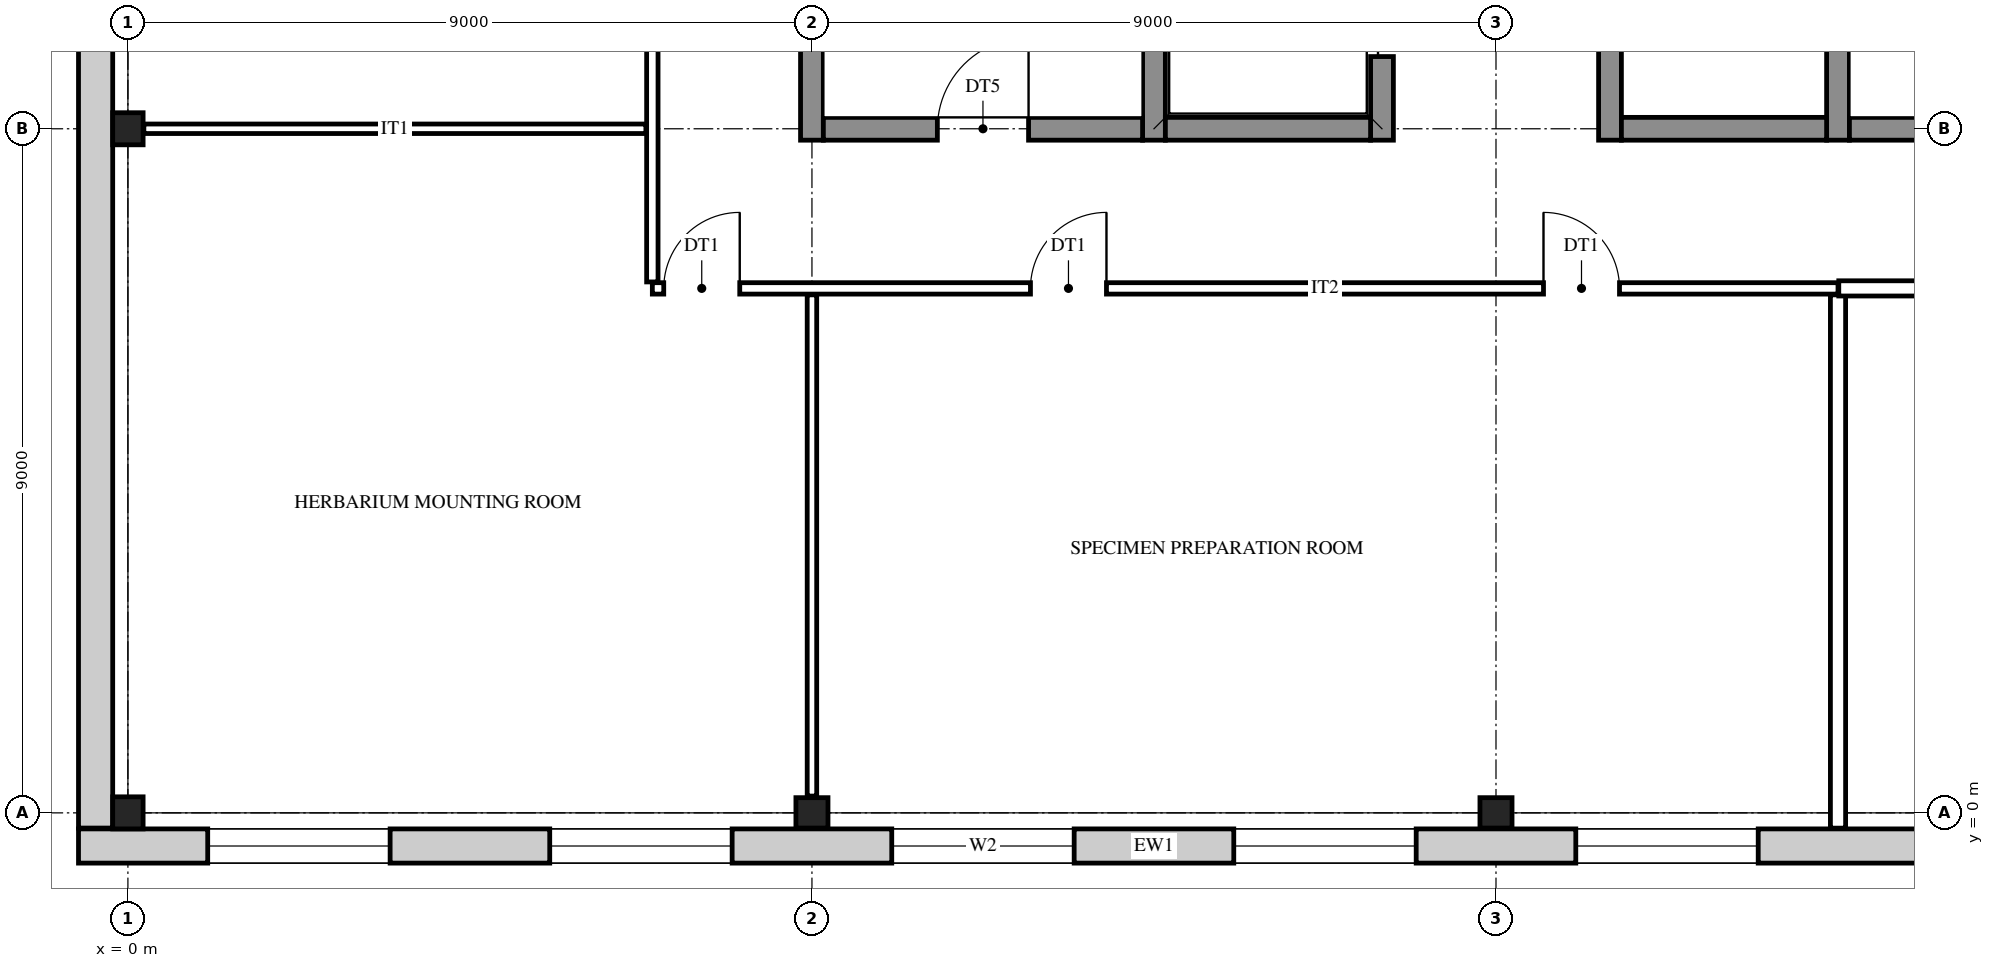
"""IFC4 building model, lengths in metres.
Left out: names, types, materials, properties, quantities, classifications, styles, units other than length and angle.
Written with IfcOpenShell. Run it as: python <this file> out.ifc"""

import sys

from ifc_helpers import new_model, si_unit, direction, frame, frame_2d, origin, origin_2d, place, context, subcontext, project, spatial, rectangle, i_section, extrude, element, fill, save


model = new_model("IFC4")
c1 = context("Model", 3, precision=1e-05, world=origin(), true_north=direction((0.0, 1.0)))
c2 = subcontext(c1, "Body", "Model", "MODEL_VIEW")
j1 = project(units=[si_unit("LENGTHUNIT", "METRE"), si_unit("PLANEANGLEUNIT", "RADIAN")], contexts=[c1])
p1 = place(None, origin())
s1 = spatial("IfcSite", under=j1, at=p1, CompositionType="ELEMENT")
p2 = place(p1, origin())
s2 = spatial("IfcBuilding", under=s1, at=p2, CompositionType="ELEMENT")
p3 = place(p2, frame((0.0, 0.0, 10.5)))
s3 = spatial("IfcBuildingStorey", under=s2, at=p3, CompositionType="ELEMENT", Elevation=10.5)
for number, where, z_axis, x_axis in (
    (1, (0.0, 0.0, 0.0), (0.0, 0.0, 1.0), (1.0, 0.0, 0.0)),
    (2, (0.0, 9.0, 0.0), (0.0, 0.0, 1.0), (1.0, 0.0, 0.0)),
    (3, (9.0, 0.0, 0.0), (0.0, 0.0, 1.0), (0.0, 1.0, 0.0)),
    (4, (18.0, 0.0, 0.0), (0.0, 0.0, 1.0), (0.0, 1.0, 0.0)),
):
    element("IfcColumn", number, at=place(p3, frame(where, z_axis=z_axis, x_axis=x_axis)), inside=s3, PredefinedType="COLUMN", context=c2, shape_type="SweptSolid", body=[
        extrude(i_section(OverallWidth=0.4, OverallDepth=0.422, WebThickness=0.028, FlangeThickness=0.036, at=origin_2d()), origin(), (0.0, 0.0, 1.0), 4.5),
    ])
for number, where, z_axis, x_axis in (
    (5, (9.0, 8.85, 0.0), (0.0, 0.0, 1.0), (0.0, 1.0, 0.0)),
    (6, (13.5, 8.85, 0.0), (0.0, 0.0, 1.0), (0.0, 1.0, 0.0)),
):
    element("IfcWall", number, at=place(p3, frame(where, z_axis=z_axis, x_axis=x_axis)), inside=s3, PredefinedType="SHEAR", context=c2, shape_type="SweptSolid", body=[
        extrude(rectangle(XDim=9.3, YDim=0.3, at=frame_2d((4.65, 0.0))), origin(), (0.0, 0.0, 1.0), 4.5),
    ])
p4 = place(p3, frame((16.5, 8.85, 0.0), z_axis=(0.0, 0.0, 1.0), x_axis=(0.0, 1.0, 0.0)))
e7 = element("IfcWall", 7, at=p4, inside=s3, PredefinedType="SHEAR", context=c2, shape_type="SweptSolid", body=[
    extrude(rectangle(XDim=9.3, YDim=0.3, at=frame_2d((4.65, 0.0))), origin(), (0.0, 0.0, 1.0), 4.5),
])
p5 = place(p4, frame((1.1, 0.0, 0.0)))
e8 = element("IfcOpeningElement", 8, at=p5, cuts=e7, PredefinedType="OPENING", context=c2, shape_type="SweptSolid", body=[
    extrude(rectangle(XDim=1.1, YDim=2.1, at=frame_2d((0.55, 1.05))), frame((0.0, 0.16, 0.0), z_axis=(0.0, -1.0, 0.0), x_axis=(1.0, 0.0, 0.0)), (0.0, 0.0, 1.0), 0.32),
])
p6 = place(p4, frame((4.1, 0.0, 0.0)))
e9 = element("IfcOpeningElement", 9, at=p6, cuts=e7, PredefinedType="OPENING", context=c2, shape_type="SweptSolid", body=[
    extrude(rectangle(XDim=1.1, YDim=2.1, at=frame_2d((0.55, 1.05))), frame((0.0, 0.16, 0.0), z_axis=(0.0, -1.0, 0.0), x_axis=(1.0, 0.0, 0.0)), (0.0, 0.0, 1.0), 0.32),
])
p7 = place(p3, frame((19.5, 8.85, 0.0), z_axis=(0.0, 0.0, 1.0), x_axis=(0.0, 1.0, 0.0)))
e10 = element("IfcWall", 10, at=p7, inside=s3, PredefinedType="SHEAR", context=c2, shape_type="SweptSolid", body=[
    extrude(rectangle(XDim=9.3, YDim=0.3, at=frame_2d((4.65, 0.0))), origin(), (0.0, 0.0, 1.0), 4.5),
])
p8 = place(p7, frame((3.95, 0.0, 0.0)))
e11 = element("IfcOpeningElement", 11, at=p8, cuts=e10, PredefinedType="OPENING", context=c2, shape_type="SweptSolid", body=[
    extrude(rectangle(XDim=1.4, YDim=2.1, at=frame_2d((0.7, 1.05))), frame((0.0, 0.16, 0.0), z_axis=(0.0, -1.0, 0.0), x_axis=(1.0, 0.0, 0.0)), (0.0, 0.0, 1.0), 0.32),
])
p9 = place(p7, frame((7.1, 0.0, 0.0)))
e12 = element("IfcOpeningElement", 12, at=p9, cuts=e10, PredefinedType="OPENING", context=c2, shape_type="SweptSolid", body=[
    extrude(rectangle(XDim=1.1, YDim=2.1, at=frame_2d((0.55, 1.05))), frame((0.0, 0.16, 0.0), z_axis=(0.0, -1.0, 0.0), x_axis=(1.0, 0.0, 0.0)), (0.0, 0.0, 1.0), 0.32),
])
p10 = place(p3, frame((22.5, 8.85, 0.0), z_axis=(0.0, 0.0, 1.0), x_axis=(0.0, 1.0, 0.0)))
e13 = element("IfcWall", 13, at=p10, inside=s3, PredefinedType="SHEAR", context=c2, shape_type="SweptSolid", body=[
    extrude(rectangle(XDim=9.3, YDim=0.3, at=frame_2d((4.65, 0.0))), origin(), (0.0, 0.0, 1.0), 4.5),
])
p11 = place(p3, frame((9.15, 9.0, 0.0), z_axis=(0.0, 0.0, 1.0), x_axis=(1.0, 0.0, 0.0)))
e14 = element("IfcWall", 14, at=p11, inside=s3, PredefinedType="SHEAR", context=c2, shape_type="SweptSolid", body=[
    extrude(rectangle(XDim=4.2, YDim=0.3, at=frame_2d((2.1, 0.0))), origin(), (0.0, 0.0, 1.0), 4.5),
])
p12 = place(p11, frame((1.5, 0.0, 0.0)))
e15 = element("IfcOpeningElement", 15, at=p12, cuts=e14, PredefinedType="OPENING", context=c2, shape_type="SweptSolid", body=[
    extrude(rectangle(XDim=1.2, YDim=2.1, at=frame_2d((0.6, 1.05))), frame((0.0, 0.16, 0.0), z_axis=(0.0, -1.0, 0.0), x_axis=(1.0, 0.0, 0.0)), (0.0, 0.0, 1.0), 0.32),
])
for number, where, z_axis, x_axis in (
    (16, (13.65, 9.0, 0.0), (0.0, 0.0, 1.0), (1.0, 0.0, 0.0)),
    (17, (19.65, 9.0, 0.0), (0.0, 0.0, 1.0), (1.0, 0.0, 0.0)),
):
    element("IfcWall", number, at=place(p3, frame(where, z_axis=z_axis, x_axis=x_axis)), inside=s3, PredefinedType="SHEAR", context=c2, shape_type="SweptSolid", body=[
        extrude(rectangle(XDim=2.7, YDim=0.3, at=frame_2d((1.35, 0.0))), origin(), (0.0, 0.0, 1.0), 4.5),
    ])
p13 = place(p3, frame((22.65, 9.0, 0.0), z_axis=(0.0, 0.0, 1.0), x_axis=(1.0, 0.0, 0.0)))
e18 = element("IfcWall", 18, at=p13, inside=s3, PredefinedType="SHEAR", context=c2, shape_type="SweptSolid", body=[
    extrude(rectangle(XDim=4.2, YDim=0.3, at=frame_2d((2.1, 0.0))), origin(), (0.0, 0.0, 1.0), 4.5),
])
p14 = place(p13, frame((1.5, 0.0, 0.0)))
e19 = element("IfcOpeningElement", 19, at=p14, cuts=e18, PredefinedType="OPENING", context=c2, shape_type="SweptSolid", body=[
    extrude(rectangle(XDim=1.2, YDim=2.1, at=frame_2d((0.6, 1.05))), frame((0.0, 0.16, 0.0), z_axis=(0.0, -1.0, 0.0), x_axis=(1.0, 0.0, 0.0)), (0.0, 0.0, 1.0), 0.32),
])
p15 = place(p3, frame((32.15, -0.436, 0.0), z_axis=(0.0, 0.0, 1.0), x_axis=(-1.0, 0.0, 0.0)))
e20 = element("IfcWall", 20, at=p15, inside=s3, PredefinedType="STANDARD", context=c2, shape_type="SweptSolid", body=[
    extrude(rectangle(XDim=32.8, YDim=0.45, at=frame_2d((16.4, 0.0))), origin(), (0.0, 0.0, 1.0), 4.5),
])
p16 = place(p15, frame((28.7, 0.0, 0.9)))
e21 = element("IfcOpeningElement", 21, at=p16, cuts=e20, PredefinedType="OPENING", context=c2, shape_type="SweptSolid", body=[
    extrude(rectangle(XDim=2.4, YDim=2.8, at=frame_2d((1.2, 1.4))), frame((0.0, 0.235, 0.0), z_axis=(0.0, -1.0, 0.0), x_axis=(1.0, 0.0, 0.0)), (0.0, 0.0, 1.0), 0.47),
])
p17 = place(p15, frame((24.2, 0.0, 0.9)))
e22 = element("IfcOpeningElement", 22, at=p17, cuts=e20, PredefinedType="OPENING", context=c2, shape_type="SweptSolid", body=[
    extrude(rectangle(XDim=2.4, YDim=2.8, at=frame_2d((1.2, 1.4))), frame((0.0, 0.235, 0.0), z_axis=(0.0, -1.0, 0.0), x_axis=(1.0, 0.0, 0.0)), (0.0, 0.0, 1.0), 0.47),
])
p18 = place(p15, frame((19.7, 0.0, 0.9)))
e23 = element("IfcOpeningElement", 23, at=p18, cuts=e20, PredefinedType="OPENING", context=c2, shape_type="SweptSolid", body=[
    extrude(rectangle(XDim=2.4, YDim=2.8, at=frame_2d((1.2, 1.4))), frame((0.0, 0.235, 0.0), z_axis=(0.0, -1.0, 0.0), x_axis=(1.0, 0.0, 0.0)), (0.0, 0.0, 1.0), 0.47),
])
p19 = place(p15, frame((15.2, 0.0, 0.9)))
e24 = element("IfcOpeningElement", 24, at=p19, cuts=e20, PredefinedType="OPENING", context=c2, shape_type="SweptSolid", body=[
    extrude(rectangle(XDim=2.4, YDim=2.8, at=frame_2d((1.2, 1.4))), frame((0.0, 0.235, 0.0), z_axis=(0.0, -1.0, 0.0), x_axis=(1.0, 0.0, 0.0)), (0.0, 0.0, 1.0), 0.47),
])
p20 = place(p15, frame((10.7, 0.0, 0.9)))
e25 = element("IfcOpeningElement", 25, at=p20, cuts=e20, PredefinedType="OPENING", context=c2, shape_type="SweptSolid", body=[
    extrude(rectangle(XDim=2.4, YDim=2.8, at=frame_2d((1.2, 1.4))), frame((0.0, 0.235, 0.0), z_axis=(0.0, -1.0, 0.0), x_axis=(1.0, 0.0, 0.0)), (0.0, 0.0, 1.0), 0.47),
])
p21 = place(p15, frame((6.2, 0.0, 0.9)))
e26 = element("IfcOpeningElement", 26, at=p21, cuts=e20, PredefinedType="OPENING", context=c2, shape_type="SweptSolid", body=[
    extrude(rectangle(XDim=2.4, YDim=2.8, at=frame_2d((1.2, 1.4))), frame((0.0, 0.235, 0.0), z_axis=(0.0, -1.0, 0.0), x_axis=(1.0, 0.0, 0.0)), (0.0, 0.0, 1.0), 0.47),
])
p22 = place(p15, frame((1.7, 0.0, 0.9)))
e27 = element("IfcOpeningElement", 27, at=p22, cuts=e20, PredefinedType="OPENING", context=c2, shape_type="SweptSolid", body=[
    extrude(rectangle(XDim=2.4, YDim=2.8, at=frame_2d((1.2, 1.4))), frame((0.0, 0.235, 0.0), z_axis=(0.0, -1.0, 0.0), x_axis=(1.0, 0.0, 0.0)), (0.0, 0.0, 1.0), 0.47),
])
p23 = place(p3, frame((-0.425, -0.2, 0.0), z_axis=(0.0, 0.0, 1.0), x_axis=(0.0, 1.0, 0.0)))
e28 = element("IfcWall", 28, at=p23, inside=s3, PredefinedType="STANDARD", context=c2, shape_type="SweptSolid", body=[
    extrude(rectangle(XDim=27.4, YDim=0.45, at=frame_2d((13.7, 0.0))), origin(), (0.0, 0.0, 1.0), 4.5),
])
p24 = place(p23, frame((10.25, 0.0, 0.9)))
e29 = element("IfcOpeningElement", 29, at=p24, cuts=e28, PredefinedType="OPENING", context=c2, shape_type="SweptSolid", body=[
    extrude(rectangle(XDim=2.4, YDim=2.8, at=frame_2d((1.2, 1.4))), frame((0.0, 0.235, 0.0), z_axis=(0.0, -1.0, 0.0), x_axis=(1.0, 0.0, 0.0)), (0.0, 0.0, 1.0), 0.47),
])
p25 = place(p23, frame((14.75, 0.0, 0.9)))
e30 = element("IfcOpeningElement", 30, at=p25, cuts=e28, PredefinedType="OPENING", context=c2, shape_type="SweptSolid", body=[
    extrude(rectangle(XDim=2.4, YDim=2.8, at=frame_2d((1.2, 1.4))), frame((0.0, 0.235, 0.0), z_axis=(0.0, -1.0, 0.0), x_axis=(1.0, 0.0, 0.0)), (0.0, 0.0, 1.0), 0.47),
])
p26 = place(p3, frame((6.9, 6.985, 0.0), z_axis=(0.0, 0.0, 1.0), x_axis=(0.0, 1.0, 0.0)))
e31 = element("IfcWall", 31, at=p26, inside=s3, PredefinedType="PARTITIONING", context=c2, shape_type="SweptSolid", body=[
    extrude(rectangle(XDim=11.015, YDim=0.15, at=frame_2d((5.507, 0.0))), origin(), (0.0, 0.0, 1.0), 3.822),
])
p27 = place(p26, frame((6.015, 0.0, 0.0)))
e32 = element("IfcOpeningElement", 32, at=p27, cuts=e31, PredefinedType="OPENING", context=c2, shape_type="SweptSolid", body=[
    extrude(rectangle(XDim=1.0, YDim=2.1, at=frame_2d((0.5, 1.05))), frame((0.0, 0.085, 0.0), z_axis=(0.0, -1.0, 0.0), x_axis=(1.0, 0.0, 0.0)), (0.0, 0.0, 1.0), 0.17),
])
p28 = place(p3, frame((9.0, 0.221, 0.0), z_axis=(0.0, 0.0, 1.0), x_axis=(0.0, 1.0, 0.0)))
e33 = element("IfcWall", 33, at=p28, inside=s3, PredefinedType="PARTITIONING", context=c2, shape_type="SweptSolid", body=[
    extrude(rectangle(XDim=6.594, YDim=0.125, at=frame_2d((3.297, 0.0))), origin(), (0.0, 0.0, 1.0), 3.822),
])
p29 = place(p3, frame((22.5, -0.201, 0.0), z_axis=(0.0, 0.0, 1.0), x_axis=(0.0, 1.0, 0.0)))
e34 = element("IfcWall", 34, at=p29, inside=s3, PredefinedType="PARTITIONING", context=c2, shape_type="SweptSolid", body=[
    extrude(rectangle(XDim=7.016, YDim=0.2, at=frame_2d((3.508, 0.0))), origin(), (0.0, 0.0, 1.0), 3.822),
])
p30 = place(p3, frame((6.9, 6.9, 0.0), z_axis=(0.0, 0.0, 1.0), x_axis=(1.0, 0.0, 0.0)))
e35 = element("IfcWall", 35, at=p30, inside=s3, PredefinedType="PARTITIONING", context=c2, shape_type="SweptSolid", body=[
    extrude(rectangle(XDim=15.6, YDim=0.15, at=frame_2d((7.8, 0.0))), origin(), (0.0, 0.0, 1.0), 3.822),
])
p31 = place(p30, frame((0.15, 0.0, 0.0)))
e36 = element("IfcOpeningElement", 36, at=p31, cuts=e35, PredefinedType="OPENING", context=c2, shape_type="SweptSolid", body=[
    extrude(rectangle(XDim=1.0, YDim=2.1, at=frame_2d((0.5, 1.05))), frame((0.0, 0.085, 0.0), z_axis=(0.0, -1.0, 0.0), x_axis=(1.0, 0.0, 0.0)), (0.0, 0.0, 1.0), 0.17),
])
p32 = place(p30, frame((11.725, 0.0, 0.0)))
e37 = element("IfcOpeningElement", 37, at=p32, cuts=e35, PredefinedType="OPENING", context=c2, shape_type="SweptSolid", body=[
    extrude(rectangle(XDim=1.0, YDim=2.1, at=frame_2d((0.5, 1.05))), frame((0.0, 0.085, 0.0), z_axis=(0.0, -1.0, 0.0), x_axis=(1.0, 0.0, 0.0)), (0.0, 0.0, 1.0), 0.17),
])
p33 = place(p30, frame((4.975, 0.0, 0.0)))
e38 = element("IfcOpeningElement", 38, at=p33, cuts=e35, PredefinedType="OPENING", context=c2, shape_type="SweptSolid", body=[
    extrude(rectangle(XDim=1.0, YDim=2.1, at=frame_2d((0.5, 1.05))), frame((0.0, 0.085, 0.0), z_axis=(0.0, -1.0, 0.0), x_axis=(1.0, 0.0, 0.0)), (0.0, 0.0, 1.0), 0.17),
])
p34 = place(p3, frame((22.51, 6.9, 0.0), z_axis=(0.0, 0.0, 1.0), x_axis=(1.0, 0.0, 0.0)))
e39 = element("IfcWall", 39, at=p34, inside=s3, PredefinedType="PARTITIONING", context=c2, shape_type="SweptSolid", body=[
    extrude(rectangle(XDim=4.38, YDim=0.2, at=frame_2d((2.19, 0.0))), origin(), (0.0, 0.0, 1.0), 3.822),
])
p35 = place(p34, frame((2.94, 0.0, 0.0)))
e40 = element("IfcOpeningElement", 40, at=p35, cuts=e39, PredefinedType="OPENING", context=c2, shape_type="SweptSolid", body=[
    extrude(rectangle(XDim=1.0, YDim=2.1, at=frame_2d((0.5, 1.05))), frame((0.0, 0.11, 0.0), z_axis=(0.0, -1.0, 0.0), x_axis=(1.0, 0.0, 0.0)), (0.0, 0.0, 1.0), 0.22),
])
p36 = place(p3, frame((0.21, 9.0, 0.0), z_axis=(0.0, 0.0, 1.0), x_axis=(1.0, 0.0, 0.0)))
e41 = element("IfcWall", 41, at=p36, inside=s3, PredefinedType="PARTITIONING", context=c2, shape_type="SweptSolid", body=[
    extrude(rectangle(XDim=6.605, YDim=0.125, at=frame_2d((3.302, 0.0))), origin(), (0.0, 0.0, 1.0), 3.822),
])
p37 = place(p16, origin())
e42 = element("IfcWindow", 42, at=p37, inside=s3, PartitioningType="SINGLE_PANEL", PredefinedType="WINDOW", context=c2, shape_type="SweptSolid", body=[
    extrude(rectangle(XDim=2.4, YDim=2.8, at=frame_2d((1.2, 1.4))), frame((0.0, 0.03, 0.0), z_axis=(0.0, -1.0, 0.0), x_axis=(1.0, 0.0, 0.0)), (0.0, 0.0, 1.0), 0.06),
])
fill(e21, e42)
p38 = place(p17, origin())
e43 = element("IfcWindow", 43, at=p38, inside=s3, PartitioningType="SINGLE_PANEL", PredefinedType="WINDOW", context=c2, shape_type="SweptSolid", body=[
    extrude(rectangle(XDim=2.4, YDim=2.8, at=frame_2d((1.2, 1.4))), frame((0.0, 0.03, 0.0), z_axis=(0.0, -1.0, 0.0), x_axis=(1.0, 0.0, 0.0)), (0.0, 0.0, 1.0), 0.06),
])
fill(e22, e43)
p39 = place(p18, origin())
e44 = element("IfcWindow", 44, at=p39, inside=s3, PartitioningType="SINGLE_PANEL", PredefinedType="WINDOW", context=c2, shape_type="SweptSolid", body=[
    extrude(rectangle(XDim=2.4, YDim=2.8, at=frame_2d((1.2, 1.4))), frame((0.0, 0.03, 0.0), z_axis=(0.0, -1.0, 0.0), x_axis=(1.0, 0.0, 0.0)), (0.0, 0.0, 1.0), 0.06),
])
fill(e23, e44)
p40 = place(p19, origin())
e45 = element("IfcWindow", 45, at=p40, inside=s3, PartitioningType="SINGLE_PANEL", PredefinedType="WINDOW", context=c2, shape_type="SweptSolid", body=[
    extrude(rectangle(XDim=2.4, YDim=2.8, at=frame_2d((1.2, 1.4))), frame((0.0, 0.03, 0.0), z_axis=(0.0, -1.0, 0.0), x_axis=(1.0, 0.0, 0.0)), (0.0, 0.0, 1.0), 0.06),
])
fill(e24, e45)
p41 = place(p20, origin())
e46 = element("IfcWindow", 46, at=p41, inside=s3, PartitioningType="SINGLE_PANEL", PredefinedType="WINDOW", context=c2, shape_type="SweptSolid", body=[
    extrude(rectangle(XDim=2.4, YDim=2.8, at=frame_2d((1.2, 1.4))), frame((0.0, 0.03, 0.0), z_axis=(0.0, -1.0, 0.0), x_axis=(1.0, 0.0, 0.0)), (0.0, 0.0, 1.0), 0.06),
])
fill(e25, e46)
p42 = place(p12, origin())
e47 = element("IfcDoor", 47, at=p42, inside=s3, OperationType="SINGLE_SWING_RIGHT", PredefinedType="DOOR", context=c2, shape_type="SweptSolid", body=[
    extrude(rectangle(XDim=1.2, YDim=2.1, at=frame_2d((0.6, 1.05))), frame((0.0, 0.025, 0.0), z_axis=(0.0, -1.0, 0.0), x_axis=(1.0, 0.0, 0.0)), (0.0, 0.0, 1.0), 0.05),
])
fill(e15, e47)
p43 = place(p31, frame((1.0, 0.0, 0.0), z_axis=(0.0, 0.0, 1.0), x_axis=(-1.0, 0.0, 0.0)))
e48 = element("IfcDoor", 48, at=p43, inside=s3, OperationType="SINGLE_SWING_RIGHT", PredefinedType="DOOR", context=c2, shape_type="SweptSolid", body=[
    extrude(rectangle(XDim=1.0, YDim=2.1, at=frame_2d((0.5, 1.05))), frame((0.0, 0.025, 0.0), z_axis=(0.0, -1.0, 0.0), x_axis=(1.0, 0.0, 0.0)), (0.0, 0.0, 1.0), 0.05),
])
fill(e36, e48)
p44 = place(p32, frame((1.0, 0.0, 0.0), z_axis=(0.0, 0.0, 1.0), x_axis=(-1.0, 0.0, 0.0)))
e49 = element("IfcDoor", 49, at=p44, inside=s3, OperationType="SINGLE_SWING_LEFT", PredefinedType="DOOR", context=c2, shape_type="SweptSolid", body=[
    extrude(rectangle(XDim=1.0, YDim=2.1, at=frame_2d((0.5, 1.05))), frame((0.0, 0.025, 0.0), z_axis=(0.0, -1.0, 0.0), x_axis=(1.0, 0.0, 0.0)), (0.0, 0.0, 1.0), 0.05),
])
fill(e37, e49)
p45 = place(p33, frame((1.0, 0.0, 0.0), z_axis=(0.0, 0.0, 1.0), x_axis=(-1.0, 0.0, 0.0)))
e50 = element("IfcDoor", 50, at=p45, inside=s3, OperationType="SINGLE_SWING_RIGHT", PredefinedType="DOOR", context=c2, shape_type="SweptSolid", body=[
    extrude(rectangle(XDim=1.0, YDim=2.1, at=frame_2d((0.5, 1.05))), frame((0.0, 0.025, 0.0), z_axis=(0.0, -1.0, 0.0), x_axis=(1.0, 0.0, 0.0)), (0.0, 0.0, 1.0), 0.05),
])
fill(e38, e50)
p46 = place(p5, origin())
e51 = element("IfcDoor", 51, at=p46, inside=s3, OperationType="DOUBLE_DOOR_SLIDING", PredefinedType="DOOR", context=c2, shape_type="SweptSolid", body=[
    extrude(rectangle(XDim=1.1, YDim=2.1, at=frame_2d((0.55, 1.05))), frame((0.0, 0.025, 0.0), z_axis=(0.0, -1.0, 0.0), x_axis=(1.0, 0.0, 0.0)), (0.0, 0.0, 1.0), 0.05),
])
fill(e8, e51)
save(model, sys.argv[1])
